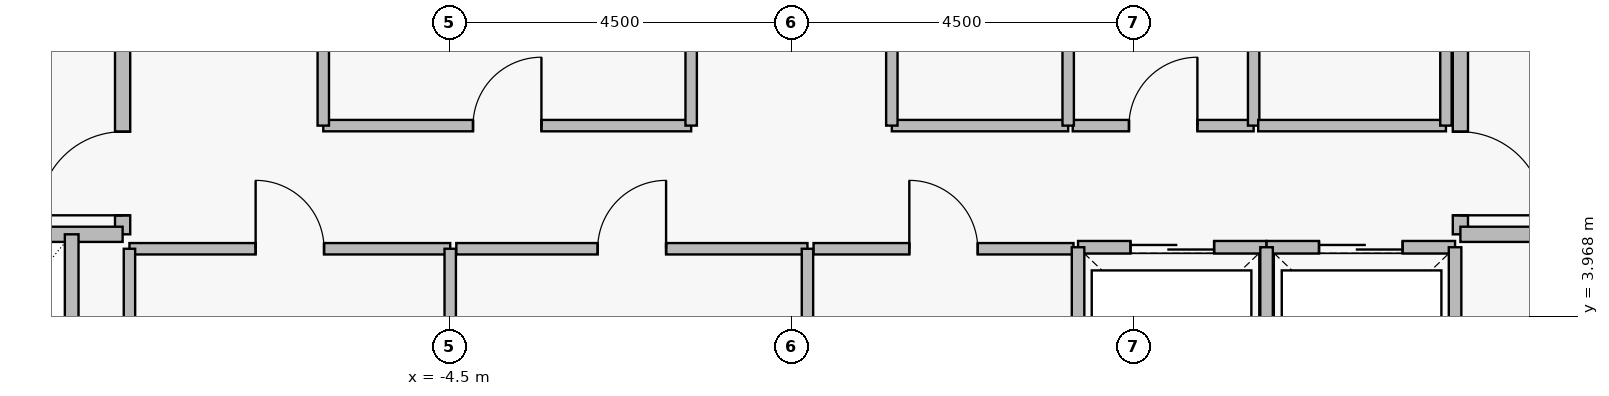
"""IFC4 building model, lengths in metres.
Left out: names, types, materials, properties, quantities, classifications, styles, units other than length and angle.
Written with IfcOpenShell. Run it as: python <this file> out.ifc"""

import sys

from ifc_helpers import new_model, si_unit, direction, frame, frame_2d, origin, place, context, subcontext, project, spatial, rectangle, extrude, element, fill, save


model = new_model("IFC4")
c1 = context("Model", 3, precision=1e-05, world=origin(), true_north=direction((0.0, 1.0)))
c2 = subcontext(c1, "Body", "Model", "MODEL_VIEW")
j1 = project(units=[si_unit("LENGTHUNIT", "METRE"), si_unit("PLANEANGLEUNIT", "RADIAN")], contexts=[c1])
p1 = place(None, origin())
s1 = spatial("IfcSite", under=j1, at=p1, CompositionType="ELEMENT")
p2 = place(p1, origin())
s2 = spatial("IfcBuilding", under=s1, at=p2, CompositionType="ELEMENT")
p3 = place(p2, frame((0.0, 0.0, 284.05)))
s3 = spatial("IfcBuildingStorey", under=s2, at=p3, CompositionType="ELEMENT", Elevation=284.05)
p4 = place(p3, frame((-8.8, 5.05, 0.0), z_axis=(0.0, 0.0, 1.0), x_axis=(0.0, 1.0, 0.0)))
e1 = element("IfcWall", 1, at=p4, inside=s3, PredefinedType="PARTITIONING", context=c2, shape_type="SweptSolid", body=[
    extrude(rectangle(XDim=6.1, YDim=0.2, at=frame_2d((3.05, 0.0))), origin(), (0.0, 0.0, 1.0), 4.18),
])
p5 = place(p4, frame((0.25, 0.0, 0.0)))
e2 = element("IfcOpeningElement", 2, at=p5, cuts=e1, PredefinedType="OPENING", context=c2, shape_type="SweptSolid", body=[
    extrude(rectangle(XDim=1.1, YDim=2.2, at=frame_2d((0.55, 1.1))), frame((0.0, 0.11, 0.0), z_axis=(0.0, -1.0, 0.0), x_axis=(1.0, 0.0, 0.0)), (0.0, 0.0, 1.0), 0.22),
])
p6 = place(p4, frame((3.85, 0.0, 0.0)))
e3 = element("IfcOpeningElement", 3, at=p6, cuts=e1, PredefinedType="OPENING", context=c2, shape_type="SweptSolid", body=[
    extrude(rectangle(XDim=1.1, YDim=2.2, at=frame_2d((0.55, 1.1))), frame((0.0, 0.11, 0.0), z_axis=(0.0, -1.0, 0.0), x_axis=(1.0, 0.0, 0.0)), (0.0, 0.0, 1.0), 0.22),
])
p7 = place(p3, frame((8.8, 11.15, 0.0), z_axis=(0.0, 0.0, 1.0), x_axis=(0.0, -1.0, 0.0)))
e4 = element("IfcWall", 4, at=p7, inside=s3, PredefinedType="PARTITIONING", context=c2, shape_type="SweptSolid", body=[
    extrude(rectangle(XDim=6.1, YDim=0.2, at=frame_2d((3.05, 0.0))), origin(), (0.0, 0.0, 1.0), 4.18),
])
p8 = place(p7, frame((1.15, 0.0, 0.0)))
e5 = element("IfcOpeningElement", 5, at=p8, cuts=e4, PredefinedType="OPENING", context=c2, shape_type="SweptSolid", body=[
    extrude(rectangle(XDim=1.1, YDim=2.2, at=frame_2d((0.55, 1.1))), frame((0.0, 0.11, 0.0), z_axis=(0.0, -1.0, 0.0), x_axis=(1.0, 0.0, 0.0)), (0.0, 0.0, 1.0), 0.22),
])
p9 = place(p7, frame((4.75, 0.0, 0.0)))
e6 = element("IfcOpeningElement", 6, at=p9, cuts=e4, PredefinedType="OPENING", context=c2, shape_type="SweptSolid", body=[
    extrude(rectangle(XDim=1.1, YDim=2.2, at=frame_2d((0.55, 1.1))), frame((0.0, 0.11, 0.0), z_axis=(0.0, -1.0, 0.0), x_axis=(1.0, 0.0, 0.0)), (0.0, 0.0, 1.0), 0.22),
])
p10 = place(p3, frame((3.77, 4.88, 0.0), z_axis=(0.0, 0.0, 1.0), x_axis=(1.0, 0.0, 0.0)))
e7 = element("IfcWall", 7, at=p10, inside=s3, PredefinedType="PARTITIONING", context=c2, shape_type="SweptSolid", body=[
    extrude(rectangle(XDim=2.48, YDim=0.165, at=frame_2d((1.24, 0.0))), origin(), (0.0, 0.0, 1.0), 4.18),
])
p11 = place(p10, frame((0.69, 0.0, 0.0)))
e8 = element("IfcOpeningElement", 8, at=p11, cuts=e7, PredefinedType="OPENING", context=c2, shape_type="SweptSolid", body=[
    extrude(rectangle(XDim=1.1, YDim=2.25, at=frame_2d((0.55, 1.125))), frame((0.0, 0.093, 0.0), z_axis=(0.0, -1.0, 0.0), x_axis=(1.0, 0.0, 0.0)), (0.0, 0.0, 1.0), 0.185),
])
p12 = place(p3, frame((6.25, 4.88, 0.0), z_axis=(0.0, 0.0, 1.0), x_axis=(1.0, 0.0, 0.0)))
e9 = element("IfcWall", 9, at=p12, inside=s3, PredefinedType="PARTITIONING", context=c2, shape_type="SweptSolid", body=[
    extrude(rectangle(XDim=2.48, YDim=0.165, at=frame_2d((1.24, 0.0))), origin(), (0.0, 0.0, 1.0), 4.18),
])
p13 = place(p12, frame((0.69, 0.0, 0.0)))
e10 = element("IfcOpeningElement", 10, at=p13, cuts=e9, PredefinedType="OPENING", context=c2, shape_type="SweptSolid", body=[
    extrude(rectangle(XDim=1.1, YDim=2.25, at=frame_2d((0.55, 1.125))), frame((0.0, 0.093, 0.0), z_axis=(0.0, -1.0, 0.0), x_axis=(1.0, 0.0, 0.0)), (0.0, 0.0, 1.0), 0.185),
])
p14 = place(p3, frame((-8.71, 4.86, 0.0), z_axis=(0.0, 0.0, 1.0), x_axis=(1.0, 0.0, 0.0)))
e11 = element("IfcWall", 11, at=p14, inside=s3, PredefinedType="PARTITIONING", context=c2, shape_type="SweptSolid", body=[
    extrude(rectangle(XDim=4.22, YDim=0.15, at=frame_2d((2.11, 0.0))), origin(), (0.0, 0.0, 1.0), 4.18),
])
p15 = place(p14, frame((1.66, 0.0, 0.0)))
e12 = element("IfcOpeningElement", 12, at=p15, cuts=e11, PredefinedType="OPENING", context=c2, shape_type="SweptSolid", body=[
    extrude(rectangle(XDim=0.9, YDim=2.15, at=frame_2d((0.45, 1.075))), frame((0.0, 0.085, 0.0), z_axis=(0.0, -1.0, 0.0), x_axis=(1.0, 0.0, 0.0)), (0.0, 0.0, 1.0), 0.17),
])
p16 = place(p3, frame((-4.41, 4.86, 0.0), z_axis=(0.0, 0.0, 1.0), x_axis=(1.0, 0.0, 0.0)))
e13 = element("IfcWall", 13, at=p16, inside=s3, PredefinedType="PARTITIONING", context=c2, shape_type="SweptSolid", body=[
    extrude(rectangle(XDim=4.62, YDim=0.15, at=frame_2d((2.31, 0.0))), origin(), (0.0, 0.0, 1.0), 4.18),
])
p17 = place(p16, frame((1.86, 0.0, 0.0)))
e14 = element("IfcOpeningElement", 14, at=p17, cuts=e13, PredefinedType="OPENING", context=c2, shape_type="SweptSolid", body=[
    extrude(rectangle(XDim=0.9, YDim=2.15, at=frame_2d((0.45, 1.075))), frame((0.0, 0.085, 0.0), z_axis=(0.0, -1.0, 0.0), x_axis=(1.0, 0.0, 0.0)), (0.0, 0.0, 1.0), 0.17),
])
p18 = place(p3, frame((0.29, 4.86, 0.0), z_axis=(0.0, 0.0, 1.0), x_axis=(1.0, 0.0, 0.0)))
e15 = element("IfcWall", 15, at=p18, inside=s3, PredefinedType="PARTITIONING", context=c2, shape_type="SweptSolid", body=[
    extrude(rectangle(XDim=3.42, YDim=0.15, at=frame_2d((1.71, 0.0))), origin(), (0.0, 0.0, 1.0), 4.18),
])
p19 = place(p18, frame((1.26, 0.0, 0.0)))
e16 = element("IfcOpeningElement", 16, at=p19, cuts=e15, PredefinedType="OPENING", context=c2, shape_type="SweptSolid", body=[
    extrude(rectangle(XDim=0.9, YDim=2.15, at=frame_2d((0.45, 1.075))), frame((0.0, 0.085, 0.0), z_axis=(0.0, -1.0, 0.0), x_axis=(1.0, 0.0, 0.0)), (0.0, 0.0, 1.0), 0.17),
])
p20 = place(p3, frame((-6.16, 6.48, 0.0), z_axis=(0.0, 0.0, 1.0), x_axis=(1.0, 0.0, 0.0)))
e17 = element("IfcWall", 17, at=p20, inside=s3, PredefinedType="PARTITIONING", context=c2, shape_type="SweptSolid", body=[
    extrude(rectangle(XDim=4.84, YDim=0.15, at=frame_2d((2.42, 0.0))), origin(), (0.0, 0.0, 1.0), 4.18),
])
p21 = place(p20, frame((1.97, 0.0, 0.0)))
e18 = element("IfcOpeningElement", 18, at=p21, cuts=e17, PredefinedType="OPENING", context=c2, shape_type="SweptSolid", body=[
    extrude(rectangle(XDim=0.9, YDim=2.15, at=frame_2d((0.45, 1.075))), frame((0.0, 0.085, 0.0), z_axis=(0.0, -1.0, 0.0), x_axis=(1.0, 0.0, 0.0)), (0.0, 0.0, 1.0), 0.17),
])
p22 = place(p3, frame((3.7, 6.48, 0.0), z_axis=(0.0, 0.0, 1.0), x_axis=(1.0, 0.0, 0.0)))
e19 = element("IfcWall", 19, at=p22, inside=s3, PredefinedType="PARTITIONING", context=c2, shape_type="SweptSolid", body=[
    extrude(rectangle(XDim=2.38, YDim=0.15, at=frame_2d((1.19, 0.0))), origin(), (0.0, 0.0, 1.0), 4.18),
])
p23 = place(p22, frame((0.74, 0.0, 0.0)))
e20 = element("IfcOpeningElement", 20, at=p23, cuts=e19, PredefinedType="OPENING", context=c2, shape_type="SweptSolid", body=[
    extrude(rectangle(XDim=0.9, YDim=2.15, at=frame_2d((0.45, 1.075))), frame((0.0, 0.085, 0.0), z_axis=(0.0, -1.0, 0.0), x_axis=(1.0, 0.0, 0.0)), (0.0, 0.0, 1.0), 0.17),
])
for number, where, z_axis, x_axis in (
    (21, (-11.65, 5.05, 0.0), (0.0, 0.0, 1.0), (1.0, 0.0, 0.0)),
    (22, (8.8, 5.05, 0.0), (0.0, 0.0, 1.0), (1.0, 0.0, 0.0)),
):
    element("IfcWall", number, at=place(p3, frame(where, z_axis=z_axis, x_axis=x_axis)), inside=s3, PredefinedType="PARTITIONING", context=c2, shape_type="SweptSolid", body=[
        extrude(rectangle(XDim=2.85, YDim=0.2, at=frame_2d((1.425, 0.0))), origin(), (0.0, 0.0, 1.0), 4.18),
    ])
for number, where, z_axis, x_axis in (
    (23, (3.77, 2.52, 0.0), (0.0, 0.0, 1.0), (0.0, 1.0, 0.0)),
    (24, (6.25, 2.52, 0.0), (0.0, 0.0, 1.0), (0.0, 1.0, 0.0)),
    (25, (8.73, 2.52, 0.0), (0.0, 0.0, 1.0), (0.0, 1.0, 0.0)),
):
    element("IfcWall", number, at=place(p3, frame(where, z_axis=z_axis, x_axis=x_axis)), inside=s3, PredefinedType="PARTITIONING", context=c2, shape_type="SweptSolid", body=[
        extrude(rectangle(XDim=2.36, YDim=0.165, at=frame_2d((1.18, 0.0))), origin(), (0.0, 0.0, 1.0), 4.18),
    ])
for number, where, z_axis, x_axis in (
    (26, (-8.71, 2.49, 0.0), (0.0, 0.0, 1.0), (0.0, 1.0, 0.0)),
    (27, (-4.49, 2.49, 0.0), (0.0, 0.0, 1.0), (0.0, 1.0, 0.0)),
    (28, (0.21, 2.49, 0.0), (0.0, 0.0, 1.0), (0.0, 1.0, 0.0)),
):
    element("IfcWall", number, at=place(p3, frame(where, z_axis=z_axis, x_axis=x_axis)), inside=s3, PredefinedType="PARTITIONING", context=c2, shape_type="SweptSolid", body=[
        extrude(rectangle(XDim=2.37, YDim=0.15, at=frame_2d((1.185, 0.0))), origin(), (0.0, 0.0, 1.0), 4.18),
    ])
p24 = place(p3, frame((-9.47, 2.45, 0.0), z_axis=(0.0, 0.0, 1.0), x_axis=(0.0, 1.0, 0.0)))
e29 = element("IfcWall", 29, at=p24, inside=s3, PredefinedType="PARTITIONING", context=c2, shape_type="SweptSolid", body=[
    extrude(rectangle(XDim=2.6, YDim=0.18, at=frame_2d((1.3, 0.0))), origin(), (0.0, 0.0, 1.0), 4.18),
])
for number, where, z_axis, x_axis in (
    (30, (-6.16, 6.48, 0.0), (0.0, 0.0, 1.0), (0.0, 1.0, 0.0)),
    (31, (-1.32, 6.48, 0.0), (0.0, 0.0, 1.0), (0.0, 1.0, 0.0)),
):
    element("IfcWall", number, at=place(p3, frame(where, z_axis=z_axis, x_axis=x_axis)), inside=s3, PredefinedType="PARTITIONING", context=c2, shape_type="SweptSolid", body=[
        extrude(rectangle(XDim=2.24, YDim=0.15, at=frame_2d((1.12, 0.0))), origin(), (0.0, 0.0, 1.0), 4.18),
    ])
p25 = place(p3, frame((1.32, 6.48, 0.0), z_axis=(0.0, 0.0, 1.0), x_axis=(1.0, 0.0, 0.0)))
e32 = element("IfcWall", 32, at=p25, inside=s3, PredefinedType="PARTITIONING", context=c2, shape_type="SweptSolid", body=[
    extrude(rectangle(XDim=2.32, YDim=0.15, at=frame_2d((1.16, 0.0))), origin(), (0.0, 0.0, 1.0), 4.18),
])
for number, where, z_axis, x_axis in (
    (33, (1.32, 6.48, 0.0), (0.0, 0.0, 1.0), (0.0, 1.0, 0.0)),
    (34, (3.64, 6.48, 0.0), (0.0, 0.0, 1.0), (0.0, 1.0, 0.0)),
    (35, (6.08, 6.48, 0.0), (0.0, 0.0, 1.0), (0.0, 1.0, 0.0)),
):
    element("IfcWall", number, at=place(p3, frame(where, z_axis=z_axis, x_axis=x_axis)), inside=s3, PredefinedType="PARTITIONING", context=c2, shape_type="SweptSolid", body=[
        extrude(rectangle(XDim=2.24, YDim=0.15, at=frame_2d((1.12, 0.0))), origin(), (0.0, 0.0, 1.0), 4.18),
    ])
p26 = place(p3, frame((6.14, 6.48, 0.0), z_axis=(0.0, 0.0, 1.0), x_axis=(1.0, 0.0, 0.0)))
e36 = element("IfcWall", 36, at=p26, inside=s3, PredefinedType="PARTITIONING", context=c2, shape_type="SweptSolid", body=[
    extrude(rectangle(XDim=2.47, YDim=0.15, at=frame_2d((1.235, 0.0))), origin(), (0.0, 0.0, 1.0), 4.18),
])
p27 = place(p3, frame((8.61, 6.48, 0.0), z_axis=(0.0, 0.0, 1.0), x_axis=(0.0, 1.0, 0.0)))
e37 = element("IfcWall", 37, at=p27, inside=s3, PredefinedType="PARTITIONING", context=c2, shape_type="SweptSolid", body=[
    extrude(rectangle(XDim=2.24, YDim=0.15, at=frame_2d((1.12, 0.0))), origin(), (0.0, 0.0, 1.0), 4.18),
])
p28 = place(p5, origin())
e38 = element("IfcDoor", 38, at=p28, inside=s3, OperationType="SINGLE_SWING_LEFT", PredefinedType="DOOR", context=c2, shape_type="SweptSolid", body=[
    extrude(rectangle(XDim=1.1, YDim=2.2, at=frame_2d((0.55, 1.1))), frame((0.0, 0.025, 0.0), z_axis=(0.0, -1.0, 0.0), x_axis=(1.0, 0.0, 0.0)), (0.0, 0.0, 1.0), 0.05),
])
fill(e2, e38)
p29 = place(p9, origin())
e39 = element("IfcDoor", 39, at=p29, inside=s3, OperationType="SINGLE_SWING_RIGHT", PredefinedType="DOOR", context=c2, shape_type="SweptSolid", body=[
    extrude(rectangle(XDim=1.1, YDim=2.2, at=frame_2d((0.55, 1.1))), frame((0.0, 0.025, 0.0), z_axis=(0.0, -1.0, 0.0), x_axis=(1.0, 0.0, 0.0)), (0.0, 0.0, 1.0), 0.05),
])
fill(e6, e39)
p30 = place(p11, origin())
e40 = element("IfcDoor", 40, at=p30, inside=s3, OperationType="SLIDING_TO_LEFT", PredefinedType="DOOR", context=c2, shape_type="SweptSolid", body=[
    extrude(rectangle(XDim=1.1, YDim=2.25, at=frame_2d((0.55, 1.125))), frame((0.0, 0.025, 0.0), z_axis=(0.0, -1.0, 0.0), x_axis=(1.0, 0.0, 0.0)), (0.0, 0.0, 1.0), 0.05),
])
fill(e8, e40)
p31 = place(p13, origin())
e41 = element("IfcDoor", 41, at=p31, inside=s3, OperationType="SLIDING_TO_LEFT", PredefinedType="DOOR", context=c2, shape_type="SweptSolid", body=[
    extrude(rectangle(XDim=1.1, YDim=2.25, at=frame_2d((0.55, 1.125))), frame((0.0, 0.025, 0.0), z_axis=(0.0, -1.0, 0.0), x_axis=(1.0, 0.0, 0.0)), (0.0, 0.0, 1.0), 0.05),
])
fill(e10, e41)
p32 = place(p15, origin())
e42 = element("IfcDoor", 42, at=p32, inside=s3, OperationType="SINGLE_SWING_LEFT", PredefinedType="DOOR", context=c2, shape_type="SweptSolid", body=[
    extrude(rectangle(XDim=0.9, YDim=2.15, at=frame_2d((0.45, 1.075))), frame((0.0, 0.025, 0.0), z_axis=(0.0, -1.0, 0.0), x_axis=(1.0, 0.0, 0.0)), (0.0, 0.0, 1.0), 0.05),
])
fill(e12, e42)
p33 = place(p17, origin())
e43 = element("IfcDoor", 43, at=p33, inside=s3, OperationType="SINGLE_SWING_RIGHT", PredefinedType="DOOR", context=c2, shape_type="SweptSolid", body=[
    extrude(rectangle(XDim=0.9, YDim=2.15, at=frame_2d((0.45, 1.075))), frame((0.0, 0.025, 0.0), z_axis=(0.0, -1.0, 0.0), x_axis=(1.0, 0.0, 0.0)), (0.0, 0.0, 1.0), 0.05),
])
fill(e14, e43)
p34 = place(p19, origin())
e44 = element("IfcDoor", 44, at=p34, inside=s3, OperationType="SINGLE_SWING_LEFT", PredefinedType="DOOR", context=c2, shape_type="SweptSolid", body=[
    extrude(rectangle(XDim=0.9, YDim=2.15, at=frame_2d((0.45, 1.075))), frame((0.0, 0.025, 0.0), z_axis=(0.0, -1.0, 0.0), x_axis=(1.0, 0.0, 0.0)), (0.0, 0.0, 1.0), 0.05),
])
fill(e16, e44)
p35 = place(p21, origin())
e45 = element("IfcDoor", 45, at=p35, inside=s3, OperationType="SINGLE_SWING_RIGHT", PredefinedType="DOOR", context=c2, shape_type="SweptSolid", body=[
    extrude(rectangle(XDim=0.9, YDim=2.15, at=frame_2d((0.45, 1.075))), frame((0.0, 0.025, 0.0), z_axis=(0.0, -1.0, 0.0), x_axis=(1.0, 0.0, 0.0)), (0.0, 0.0, 1.0), 0.05),
])
fill(e18, e45)
p36 = place(p23, origin())
e46 = element("IfcDoor", 46, at=p36, inside=s3, OperationType="SINGLE_SWING_RIGHT", PredefinedType="DOOR", context=c2, shape_type="SweptSolid", body=[
    extrude(rectangle(XDim=0.9, YDim=2.15, at=frame_2d((0.45, 1.075))), frame((0.0, 0.025, 0.0), z_axis=(0.0, -1.0, 0.0), x_axis=(1.0, 0.0, 0.0)), (0.0, 0.0, 1.0), 0.05),
])
fill(e20, e46)
save(model, sys.argv[1])
